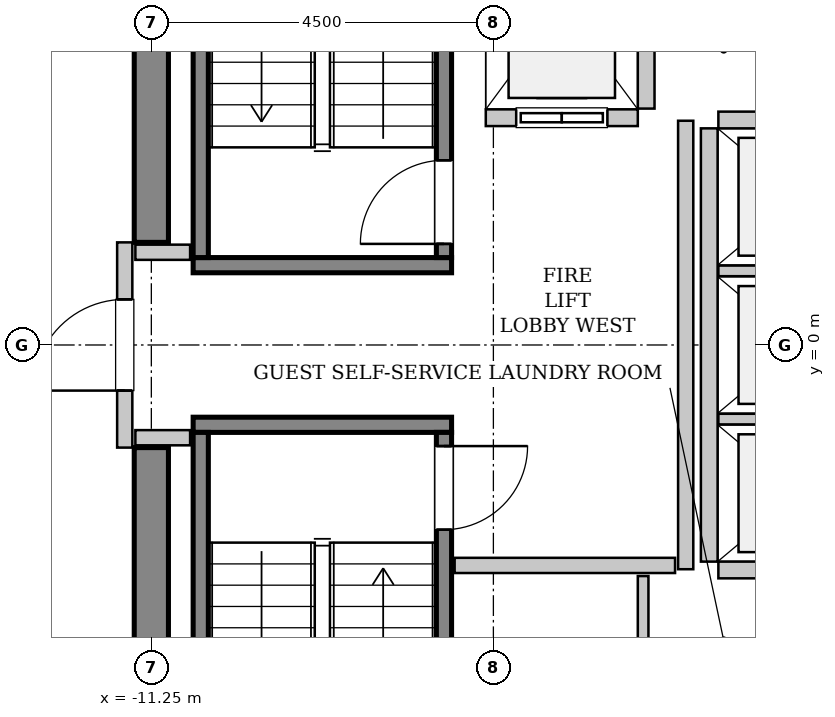
"""IFC4 building model, lengths in metres.
Left out: names, types, materials, properties, quantities, classifications, styles, units other than length and angle.
Written with IfcOpenShell. Run it as: python <this file> out.ifc"""

import sys

from ifc_helpers import new_model, si_unit, direction, frame, frame_2d, origin, place, context, subcontext, project, spatial, rectangle, extrude, source, transform, mapped, element, fill, save


model = new_model("IFC4")
c1 = context("Model", 3, precision=1e-05, world=origin(), true_north=direction((0.0, 1.0)))
c2 = subcontext(c1, "Body", "Model", "MODEL_VIEW")
j1 = project(units=[si_unit("LENGTHUNIT", "METRE"), si_unit("PLANEANGLEUNIT", "RADIAN")], contexts=[c1])
p1 = place(None, origin())
s1 = spatial("IfcSite", under=j1, at=p1, CompositionType="ELEMENT")
p2 = place(p1, origin())
s2 = spatial("IfcBuilding", under=s1, at=p2, CompositionType="ELEMENT")
p3 = place(p2, frame((0.0, 0.0, 283.6)))
s3 = spatial("IfcBuildingStorey", under=s2, at=p3, CompositionType="ELEMENT", Elevation=283.6)
m1 = source(origin(), c2, "Body", "SweptSolid", [
    extrude(rectangle(XDim=7.425, YDim=0.45, at=frame_2d((3.712, 0.0))), origin(), (0.0, 0.0, 1.0), 3.8),
])
for number, where, z_axis, x_axis in (
    (1, (-11.25, -8.775, 0.0), (0.0, 0.0, 1.0), (0.0, 1.0, 0.0)),
    (2, (-11.25, 1.35, 0.0), (0.0, 0.0, 1.0), (0.0, 1.0, 0.0)),
):
    element("IfcWall", number, at=place(p3, frame(where, z_axis=z_axis, x_axis=x_axis)), inside=s3, PredefinedType="SHEAR", context=c2, shape_type="MappedRepresentation", body=[
        mapped(m1, transform((0.0, 0.0, 0.0), x_axis=(1.0, 0.0, 0.0), y_axis=(0.0, 1.0, 0.0), z_axis=(0.0, 0.0, 1.0), scale=1.0)),
    ])
m2 = source(origin(), c2, "Body", "SweptSolid", [
    extrude(rectangle(XDim=3.4, YDim=0.2, at=frame_2d((1.7, 0.0))), origin(), (0.0, 0.0, 1.0), 3.8),
])
p4 = place(p3, frame((-7.3, 1.05, 0.0), z_axis=(0.0, 0.0, 1.0), x_axis=(-1.0, 0.0, 0.0)))
e3 = element("IfcWall", 3, at=p4, inside=s3, PredefinedType="SOLIDWALL", context=c2, shape_type="MappedRepresentation", body=[
    mapped(m2, transform((0.0, 0.0, 0.0), x_axis=(1.0, 0.0, 0.0), y_axis=(0.0, 1.0, 0.0), z_axis=(0.0, 0.0, 1.0), scale=1.0)),
])
m3 = source(origin(), c2, "Body", "SweptSolid", [
    extrude(rectangle(XDim=7.1, YDim=0.2, at=frame_2d((3.55, 0.0))), origin(), (0.0, 0.0, 1.0), 3.8),
])
p5 = place(p3, frame((-7.4, 1.15, 0.0), z_axis=(0.0, 0.0, 1.0), x_axis=(0.0, 1.0, 0.0)))
e4 = element("IfcWall", 4, at=p5, inside=s3, PredefinedType="SOLIDWALL", context=c2, shape_type="MappedRepresentation", body=[
    mapped(m3, transform((0.0, 0.0, 0.0), x_axis=(1.0, 0.0, 0.0), y_axis=(0.0, 1.0, 0.0), z_axis=(0.0, 0.0, 1.0), scale=1.0)),
])
p6 = place(p5, frame((0.18, 0.0, 0.0)))
e5 = element("IfcOpeningElement", 5, at=p6, cuts=e4, PredefinedType="OPENING", context=c2, shape_type="SweptSolid", body=[
    extrude(rectangle(XDim=1.1, YDim=2.15, at=frame_2d((0.55, 1.075))), frame((0.0, 0.11, 0.0), z_axis=(0.0, -1.0, 0.0), x_axis=(1.0, 0.0, 0.0)), (0.0, 0.0, 1.0), 0.22),
])
p7 = place(p3, frame((-10.6, 1.15, 0.0), z_axis=(0.0, 0.0, 1.0), x_axis=(0.0, 1.0, 0.0)))
e6 = element("IfcWall", 6, at=p7, inside=s3, PredefinedType="SOLIDWALL", context=c2, shape_type="MappedRepresentation", body=[
    mapped(m3, transform((0.0, 0.0, 0.0), x_axis=(1.0, 0.0, 0.0), y_axis=(0.0, 1.0, 0.0), z_axis=(0.0, 0.0, 1.0), scale=1.0)),
])
p8 = place(p3, frame((-10.7, -1.05, 0.0), z_axis=(0.0, 0.0, 1.0), x_axis=(1.0, 0.0, 0.0)))
e7 = element("IfcWall", 7, at=p8, inside=s3, PredefinedType="SOLIDWALL", context=c2, shape_type="MappedRepresentation", body=[
    mapped(m2, transform((0.0, 0.0, 0.0), x_axis=(1.0, 0.0, 0.0), y_axis=(0.0, 1.0, 0.0), z_axis=(0.0, 0.0, 1.0), scale=1.0)),
])
p9 = place(p3, frame((-10.6, -1.15, 0.0), z_axis=(0.0, 0.0, 1.0), x_axis=(0.0, -1.0, 0.0)))
e8 = element("IfcWall", 8, at=p9, inside=s3, PredefinedType="SOLIDWALL", context=c2, shape_type="MappedRepresentation", body=[
    mapped(m3, transform((0.0, 0.0, 0.0), x_axis=(1.0, 0.0, 0.0), y_axis=(0.0, 1.0, 0.0), z_axis=(0.0, 0.0, 1.0), scale=1.0)),
])
p10 = place(p3, frame((-7.4, -1.15, 0.0), z_axis=(0.0, 0.0, 1.0), x_axis=(0.0, -1.0, 0.0)))
e9 = element("IfcWall", 9, at=p10, inside=s3, PredefinedType="SOLIDWALL", context=c2, shape_type="MappedRepresentation", body=[
    mapped(m3, transform((0.0, 0.0, 0.0), x_axis=(1.0, 0.0, 0.0), y_axis=(0.0, 1.0, 0.0), z_axis=(0.0, 0.0, 1.0), scale=1.0)),
])
p11 = place(p10, frame((0.18, 0.0, 0.0)))
e10 = element("IfcOpeningElement", 10, at=p11, cuts=e9, PredefinedType="OPENING", context=c2, shape_type="SweptSolid", body=[
    extrude(rectangle(XDim=1.1, YDim=2.15, at=frame_2d((0.55, 1.075))), frame((0.0, 0.11, 0.0), z_axis=(0.0, -1.0, 0.0), x_axis=(1.0, 0.0, 0.0)), (0.0, 0.0, 1.0), 0.22),
])
m4 = source(origin(), c2, "Body", "SweptSolid", [
    extrude(rectangle(XDim=2.0, YDim=0.22, at=frame_2d((1.0, 0.0))), origin(), (0.0, 0.0, 1.0), 3.535),
])
p12 = place(p3, frame((-6.85, 2.99, 0.0), z_axis=(0.0, 0.0, 1.0), x_axis=(1.0, 0.0, 0.0)))
e11 = element("IfcWall", 11, at=p12, inside=s3, PredefinedType="SOLIDWALL", context=c2, shape_type="MappedRepresentation", body=[
    mapped(m4, transform((0.0, 0.0, 0.0), x_axis=(1.0, 0.0, 0.0), y_axis=(0.0, 1.0, 0.0), z_axis=(0.0, 0.0, 1.0), scale=1.0)),
])
p13 = place(p12, frame((0.4, 0.0, 0.0)))
e12 = element("IfcOpeningElement", 12, at=p13, cuts=e11, PredefinedType="OPENING", context=c2, shape_type="SweptSolid", body=[
    extrude(rectangle(XDim=1.2, YDim=2.2, at=frame_2d((0.6, 1.1))), frame((0.0, 0.12, 0.0), z_axis=(0.0, -1.0, 0.0), x_axis=(1.0, 0.0, 0.0)), (0.0, 0.0, 1.0), 0.24),
])
m5 = source(origin(), c2, "Body", "SweptSolid", [
    extrude(rectangle(XDim=2.68, YDim=0.22, at=frame_2d((1.34, 0.0))), origin(), (0.0, 0.0, 1.0), 3.535),
])
p14 = place(p3, frame((-4.74, 3.11, 0.0), z_axis=(0.0, 0.0, 1.0), x_axis=(0.0, 1.0, 0.0)))
e13 = element("IfcWall", 13, at=p14, inside=s3, PredefinedType="SOLIDWALL", context=c2, shape_type="MappedRepresentation", body=[
    mapped(m5, transform((0.0, 0.0, 0.0), x_axis=(1.0, 0.0, 0.0), y_axis=(0.0, 1.0, 0.0), z_axis=(0.0, 0.0, 1.0), scale=1.0)),
])
m6 = source(origin(), c2, "Body", "SweptSolid", [
    extrude(rectangle(XDim=5.7, YDim=0.22, at=frame_2d((2.85, 0.0))), origin(), (0.0, 0.0, 1.0), 3.535),
])
p15 = place(p3, frame((-3.91, 2.85, 0.0), z_axis=(0.0, 0.0, 1.0), x_axis=(0.0, -1.0, 0.0)))
e14 = element("IfcWall", 14, at=p15, inside=s3, PredefinedType="SOLIDWALL", context=c2, shape_type="MappedRepresentation", body=[
    mapped(m6, transform((0.0, 0.0, 0.0), x_axis=(1.0, 0.0, 0.0), y_axis=(0.0, 1.0, 0.0), z_axis=(0.0, 0.0, 1.0), scale=1.0)),
])
m7 = source(origin(), c2, "Body", "SweptSolid", [
    extrude(rectangle(XDim=2.13, YDim=0.22, at=frame_2d((1.065, 0.0))), origin(), (0.0, 0.0, 1.0), 3.535),
])
p16 = place(p3, frame((-3.79, -2.96, 0.0), z_axis=(0.0, 0.0, 1.0), x_axis=(1.0, 0.0, 0.0)))
e15 = element("IfcWall", 15, at=p16, inside=s3, PredefinedType="SOLIDWALL", context=c2, shape_type="MappedRepresentation", body=[
    mapped(m7, transform((0.0, 0.0, 0.0), x_axis=(1.0, 0.0, 0.0), y_axis=(0.0, 1.0, 0.0), z_axis=(0.0, 0.0, 1.0), scale=1.0)),
])
m8 = source(origin(), c2, "Body", "SweptSolid", [
    extrude(rectangle(XDim=2.13, YDim=0.14, at=frame_2d((1.065, 0.0))), origin(), (0.0, 0.0, 1.0), 3.535),
])
for number, where, z_axis, x_axis in (
    (16, (-3.79, -0.975, 0.0), (0.0, 0.0, 1.0), (1.0, 0.0, 0.0)),
    (17, (-3.79, 0.975, 0.0), (0.0, 0.0, 1.0), (1.0, 0.0, 0.0)),
):
    element("IfcWall", number, at=place(p3, frame(where, z_axis=z_axis, x_axis=x_axis)), inside=s3, PredefinedType="PARTITIONING", context=c2, shape_type="MappedRepresentation", body=[
        mapped(m8, transform((0.0, 0.0, 0.0), x_axis=(1.0, 0.0, 0.0), y_axis=(0.0, 1.0, 0.0), z_axis=(0.0, 0.0, 1.0), scale=1.0)),
    ])
p17 = place(p3, frame((-1.66, 2.96, 0.0), z_axis=(0.0, 0.0, 1.0), x_axis=(-1.0, 0.0, 0.0)))
e18 = element("IfcWall", 18, at=p17, inside=s3, PredefinedType="SOLIDWALL", context=c2, shape_type="MappedRepresentation", body=[
    mapped(m7, transform((0.0, 0.0, 0.0), x_axis=(1.0, 0.0, 0.0), y_axis=(0.0, 1.0, 0.0), z_axis=(0.0, 0.0, 1.0), scale=1.0)),
])
m9 = source(origin(), c2, "Body", "SweptSolid", [
    extrude(rectangle(XDim=2.7, YDim=0.2, at=frame_2d((1.35, 0.0))), origin(), (0.0, 0.0, 1.0), 2.625),
])
p18 = place(p3, frame((-11.6, -1.35, 0.0), z_axis=(0.0, 0.0, 1.0), x_axis=(0.0, 1.0, 0.0)))
e19 = element("IfcWall", 19, at=p18, inside=s3, PredefinedType="PARTITIONING", context=c2, shape_type="MappedRepresentation", body=[
    mapped(m9, transform((0.0, 0.0, 0.0), x_axis=(1.0, 0.0, 0.0), y_axis=(0.0, 1.0, 0.0), z_axis=(0.0, 0.0, 1.0), scale=1.0)),
])
p19 = place(p18, frame((0.75, 0.0, 0.0)))
e20 = element("IfcOpeningElement", 20, at=p19, cuts=e19, PredefinedType="OPENING", context=c2, shape_type="SweptSolid", body=[
    extrude(rectangle(XDim=1.2, YDim=2.15, at=frame_2d((0.6, 1.075))), frame((0.0, 0.11, 0.0), z_axis=(0.0, -1.0, 0.0), x_axis=(1.0, 0.0, 0.0)), (0.0, 0.0, 1.0), 0.22),
])
m10 = source(origin(), c2, "Body", "SweptSolid", [
    extrude(rectangle(XDim=5.9, YDim=0.2, at=frame_2d((2.95, 0.0))), origin(), (0.0, 0.0, 1.0), 3.535),
])
p20 = place(p3, frame((-4.22, -2.95, 0.0), z_axis=(0.0, 0.0, 1.0), x_axis=(0.0, 1.0, 0.0)))
e21 = element("IfcWall", 21, at=p20, inside=s3, PredefinedType="PARTITIONING", context=c2, shape_type="MappedRepresentation", body=[
    mapped(m10, transform((0.0, 0.0, 0.0), x_axis=(1.0, 0.0, 0.0), y_axis=(0.0, 1.0, 0.0), z_axis=(0.0, 0.0, 1.0), scale=1.0)),
])
m11 = source(origin(), c2, "Body", "SweptSolid", [
    extrude(rectangle(XDim=2.9, YDim=0.2, at=frame_2d((1.45, 0.0))), origin(), (0.0, 0.0, 1.0), 3.535),
])
p21 = place(p3, frame((-7.26, -2.9, 0.0), z_axis=(0.0, 0.0, 1.0), x_axis=(1.0, 0.0, 0.0)))
e22 = element("IfcWall", 22, at=p21, inside=s3, PredefinedType="PARTITIONING", context=c2, shape_type="MappedRepresentation", body=[
    mapped(m11, transform((0.0, 0.0, 0.0), x_axis=(1.0, 0.0, 0.0), y_axis=(0.0, 1.0, 0.0), z_axis=(0.0, 0.0, 1.0), scale=1.0)),
])
m12 = source(origin(), c2, "Body", "SweptSolid", [
    extrude(rectangle(XDim=0.72, YDim=0.2, at=frame_2d((0.36, 0.0))), origin(), (0.0, 0.0, 1.0), 3.535),
])
for number, where, z_axis, x_axis in (
    (23, (-11.46, 1.22, 0.0), (0.0, 0.0, 1.0), (1.0, 0.0, 0.0)),
    (24, (-11.46, -1.22, 0.0), (0.0, 0.0, 1.0), (1.0, 0.0, 0.0)),
):
    element("IfcWall", number, at=place(p3, frame(where, z_axis=z_axis, x_axis=x_axis)), inside=s3, PredefinedType="PARTITIONING", context=c2, shape_type="MappedRepresentation", body=[
        mapped(m12, transform((0.0, 0.0, 0.0), x_axis=(1.0, 0.0, 0.0), y_axis=(0.0, 1.0, 0.0), z_axis=(0.0, 0.0, 1.0), scale=1.0)),
    ])
m13 = source(origin(), c2, "Body", "SweptSolid", [
    extrude(rectangle(XDim=1.6, YDim=0.14, at=frame_2d((0.8, 0.0))), origin(), (0.0, 0.0, 1.0), 3.535),
])
p22 = place(p3, frame((-4.78, -4.64, 0.0), z_axis=(0.0, 0.0, 1.0), x_axis=(0.0, 1.0, 0.0)))
e25 = element("IfcWall", 25, at=p22, inside=s3, PredefinedType="PARTITIONING", context=c2, shape_type="MappedRepresentation", body=[
    mapped(m13, transform((0.0, 0.0, 0.0), x_axis=(1.0, 0.0, 0.0), y_axis=(0.0, 1.0, 0.0), z_axis=(0.0, 0.0, 1.0), scale=1.0)),
])
m14 = source(origin(), c2, "Body", "SweptSolid", [
    extrude(rectangle(XDim=1.1, YDim=2.15, at=frame_2d((0.55, 1.075))), frame((0.0, 0.025, 0.0), z_axis=(0.0, -1.0, 0.0), x_axis=(1.0, 0.0, 0.0)), (0.0, 0.0, 1.0), 0.05),
])
p23 = place(p6, origin())
e26 = element("IfcDoor", 26, at=p23, inside=s3, OperationType="SINGLE_SWING_LEFT", PredefinedType="DOOR", context=c2, shape_type="MappedRepresentation", body=[
    mapped(m14, transform((0.0, 0.0, 0.0), x_axis=(1.0, 0.0, 0.0), y_axis=(0.0, 1.0, 0.0), z_axis=(0.0, 0.0, 1.0), scale=1.0)),
])
fill(e5, e26)
p24 = place(p11, origin())
e27 = element("IfcDoor", 27, at=p24, inside=s3, OperationType="SINGLE_SWING_LEFT", PredefinedType="DOOR", context=c2, shape_type="MappedRepresentation", body=[
    mapped(m14, transform((0.0, 0.0, 0.0), x_axis=(1.0, 0.0, 0.0), y_axis=(0.0, 1.0, 0.0), z_axis=(0.0, 0.0, 1.0), scale=1.0)),
])
fill(e10, e27)
m15 = source(origin(), c2, "Body", "SweptSolid", [
    extrude(rectangle(XDim=1.2, YDim=2.2, at=frame_2d((0.6, 1.1))), frame((0.0, 0.025, 0.0), z_axis=(0.0, -1.0, 0.0), x_axis=(1.0, 0.0, 0.0)), (0.0, 0.0, 1.0), 0.05),
])
p25 = place(p13, origin())
e28 = element("IfcDoor", 28, at=p25, inside=s3, OperationType="SLIDING_TO_LEFT", PredefinedType="DOOR", context=c2, shape_type="MappedRepresentation", body=[
    mapped(m15, transform((0.0, 0.0, 0.0), x_axis=(1.0, 0.0, 0.0), y_axis=(0.0, 1.0, 0.0), z_axis=(0.0, 0.0, 1.0), scale=1.0)),
])
fill(e12, e28)
m16 = source(origin(), c2, "Body", "SweptSolid", [
    extrude(rectangle(XDim=1.2, YDim=2.15, at=frame_2d((0.6, 1.075))), frame((0.0, 0.025, 0.0), z_axis=(0.0, -1.0, 0.0), x_axis=(1.0, 0.0, 0.0)), (0.0, 0.0, 1.0), 0.05),
])
p26 = place(p19, origin())
e29 = element("IfcDoor", 29, at=p26, inside=s3, OperationType="SINGLE_SWING_LEFT", PredefinedType="DOOR", context=c2, shape_type="MappedRepresentation", body=[
    mapped(m16, transform((0.0, 0.0, 0.0), x_axis=(1.0, 0.0, 0.0), y_axis=(0.0, 1.0, 0.0), z_axis=(0.0, 0.0, 1.0), scale=1.0)),
])
fill(e20, e29)
save(model, sys.argv[1])
